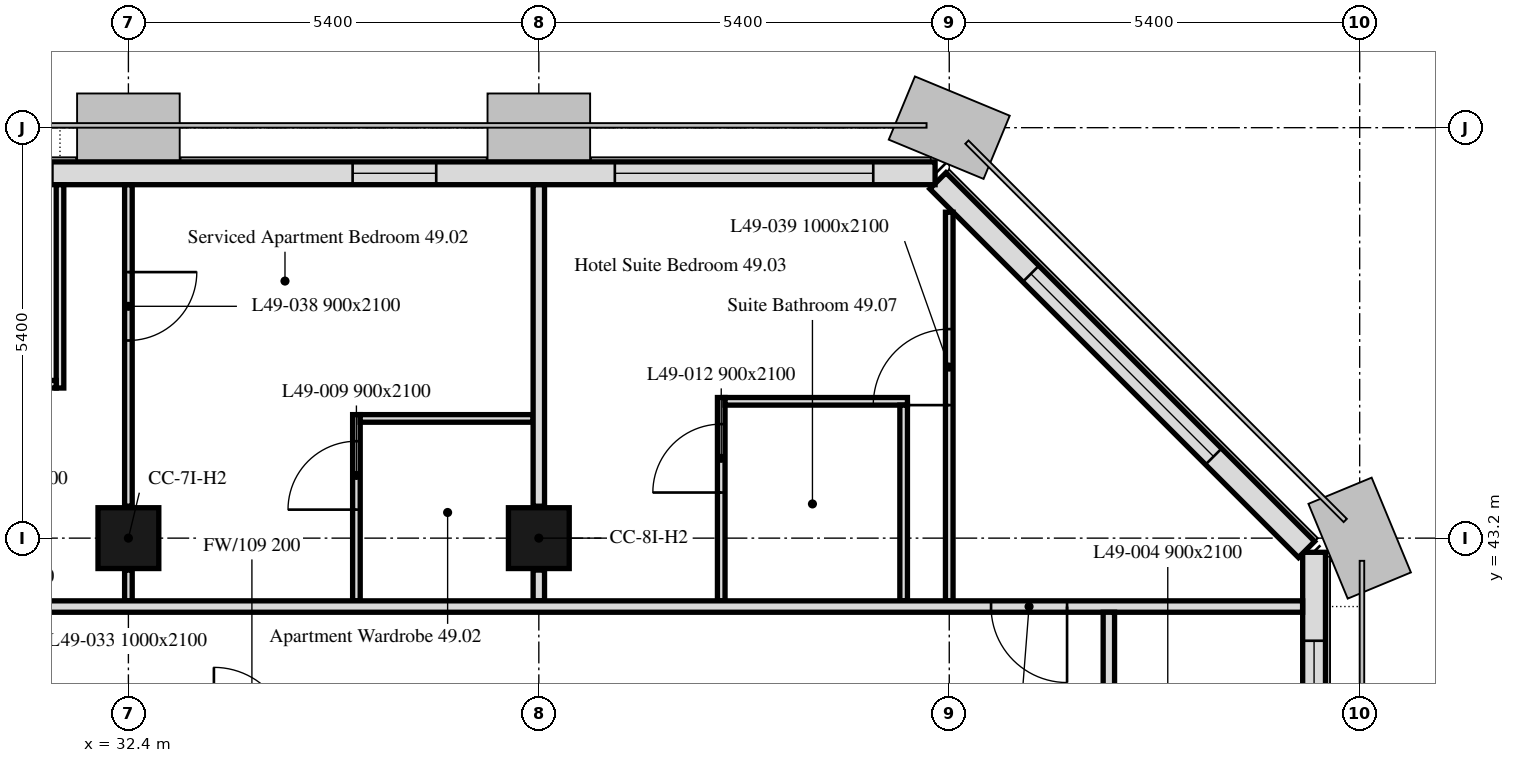
"""IFC4 building model, lengths in metres.
Left out: names, types, materials, properties, quantities, classifications, styles, units other than length and angle.
Written with IfcOpenShell. Run it as: python <this file> out.ifc"""

import sys

from ifc_helpers import new_model, si_unit, direction, frame, frame_2d, origin, origin_2d, place, context, subcontext, project, spatial, rectangle, extrude, element, fill, save


model = new_model("IFC4")
c1 = context("Model", 3, precision=1e-05, world=origin(), true_north=direction((0.0, 1.0)))
c2 = subcontext(c1, "Body", "Model", "MODEL_VIEW")
j1 = project(units=[si_unit("LENGTHUNIT", "METRE"), si_unit("PLANEANGLEUNIT", "RADIAN")], contexts=[c1])
p1 = place(None, origin())
s1 = spatial("IfcSite", under=j1, at=p1, CompositionType="ELEMENT")
p2 = place(p1, origin())
s2 = spatial("IfcBuilding", under=s1, at=p2, CompositionType="ELEMENT")
p3 = place(p2, frame((0.0, 0.0, 200.5)))
s3 = spatial("IfcBuildingStorey", under=s2, at=p3, CompositionType="ELEMENT", Elevation=200.5)
for number, where, z_axis, x_axis in (
    (1, (32.4, 43.2, 0.0), (0.0, 0.0, 1.0), (1.0, 0.0, 0.0)),
    (2, (37.8, 43.2, 0.0), (0.0, 0.0, 1.0), (1.0, 0.0, 0.0)),
):
    element("IfcColumn", number, at=place(p3, frame(where, z_axis=z_axis, x_axis=x_axis)), inside=s3, PredefinedType="COLUMN", context=c2, shape_type="SweptSolid", body=[
        extrude(rectangle(XDim=0.8, YDim=0.8, at=origin_2d()), origin(), (0.0, 0.0, 1.0), 3.0),
    ])
p4 = place(p3, frame((48.0, 10.986, 0.0), z_axis=(0.0, 0.0, 1.0), x_axis=(0.0, 1.0, 0.0)))
e3 = element("IfcWall", 3, at=p4, inside=s3, PredefinedType="SOLIDWALL", context=c2, shape_type="SweptSolid", body=[
    extrude(rectangle(XDim=32.027, YDim=0.3, at=frame_2d((16.014, 0.0))), origin(), (0.0, 0.0, 1.0), 3.0),
])
p5 = place(p4, frame((1.164, 0.0, 0.9)))
e4 = element("IfcOpeningElement", 4, at=p5, cuts=e3, PredefinedType="OPENING", context=c2, shape_type="SweptSolid", body=[
    extrude(rectangle(XDim=1.1, YDim=1.7, at=frame_2d((0.55, 0.85))), frame((0.0, 0.16, 0.0), z_axis=(0.0, -1.0, 0.0), x_axis=(1.0, 0.0, 0.0)), (0.0, 0.0, 1.0), 0.32),
])
p6 = place(p4, frame((2.764, 0.0, 0.9)))
e5 = element("IfcOpeningElement", 5, at=p6, cuts=e3, PredefinedType="OPENING", context=c2, shape_type="SweptSolid", body=[
    extrude(rectangle(XDim=1.1, YDim=1.7, at=frame_2d((0.55, 0.85))), frame((0.0, 0.16, 0.0), z_axis=(0.0, -1.0, 0.0), x_axis=(1.0, 0.0, 0.0)), (0.0, 0.0, 1.0), 0.32),
])
p7 = place(p4, frame((6.564, 0.0, 0.9)))
e6 = element("IfcOpeningElement", 6, at=p7, cuts=e3, PredefinedType="OPENING", context=c2, shape_type="SweptSolid", body=[
    extrude(rectangle(XDim=1.1, YDim=1.7, at=frame_2d((0.55, 0.85))), frame((0.0, 0.16, 0.0), z_axis=(0.0, -1.0, 0.0), x_axis=(1.0, 0.0, 0.0)), (0.0, 0.0, 1.0), 0.32),
])
p8 = place(p4, frame((8.164, 0.0, 0.9)))
e7 = element("IfcOpeningElement", 7, at=p8, cuts=e3, PredefinedType="OPENING", context=c2, shape_type="SweptSolid", body=[
    extrude(rectangle(XDim=1.1, YDim=1.7, at=frame_2d((0.55, 0.85))), frame((0.0, 0.16, 0.0), z_axis=(0.0, -1.0, 0.0), x_axis=(1.0, 0.0, 0.0)), (0.0, 0.0, 1.0), 0.32),
])
p9 = place(p4, frame((11.964, 0.0, 0.9)))
e8 = element("IfcOpeningElement", 8, at=p9, cuts=e3, PredefinedType="OPENING", context=c2, shape_type="SweptSolid", body=[
    extrude(rectangle(XDim=1.1, YDim=1.7, at=frame_2d((0.55, 0.85))), frame((0.0, 0.16, 0.0), z_axis=(0.0, -1.0, 0.0), x_axis=(1.0, 0.0, 0.0)), (0.0, 0.0, 1.0), 0.32),
])
p10 = place(p4, frame((13.564, 0.0, 0.9)))
e9 = element("IfcOpeningElement", 9, at=p10, cuts=e3, PredefinedType="OPENING", context=c2, shape_type="SweptSolid", body=[
    extrude(rectangle(XDim=1.1, YDim=1.7, at=frame_2d((0.55, 0.85))), frame((0.0, 0.16, 0.0), z_axis=(0.0, -1.0, 0.0), x_axis=(1.0, 0.0, 0.0)), (0.0, 0.0, 1.0), 0.32),
])
p11 = place(p4, frame((17.364, 0.0, 0.9)))
e10 = element("IfcOpeningElement", 10, at=p11, cuts=e3, PredefinedType="OPENING", context=c2, shape_type="SweptSolid", body=[
    extrude(rectangle(XDim=1.1, YDim=1.7, at=frame_2d((0.55, 0.85))), frame((0.0, 0.16, 0.0), z_axis=(0.0, -1.0, 0.0), x_axis=(1.0, 0.0, 0.0)), (0.0, 0.0, 1.0), 0.32),
])
p12 = place(p4, frame((18.964, 0.0, 0.9)))
e11 = element("IfcOpeningElement", 11, at=p12, cuts=e3, PredefinedType="OPENING", context=c2, shape_type="SweptSolid", body=[
    extrude(rectangle(XDim=1.1, YDim=1.7, at=frame_2d((0.55, 0.85))), frame((0.0, 0.16, 0.0), z_axis=(0.0, -1.0, 0.0), x_axis=(1.0, 0.0, 0.0)), (0.0, 0.0, 1.0), 0.32),
])
p13 = place(p4, frame((22.414, 0.0, 0.9)))
e12 = element("IfcOpeningElement", 12, at=p13, cuts=e3, PredefinedType="OPENING", context=c2, shape_type="SweptSolid", body=[
    extrude(rectangle(XDim=3.4, YDim=1.7, at=frame_2d((1.7, 0.85))), frame((0.0, 0.16, 0.0), z_axis=(0.0, -1.0, 0.0), x_axis=(1.0, 0.0, 0.0)), (0.0, 0.0, 1.0), 0.32),
])
p14 = place(p4, frame((28.789, 0.0, 0.9)))
e13 = element("IfcOpeningElement", 13, at=p14, cuts=e3, PredefinedType="OPENING", context=c2, shape_type="SweptSolid", body=[
    extrude(rectangle(XDim=0.65, YDim=1.7, at=frame_2d((0.325, 0.85))), frame((0.0, 0.16, 0.0), z_axis=(0.0, -1.0, 0.0), x_axis=(1.0, 0.0, 0.0)), (0.0, 0.0, 1.0), 0.32),
])
p15 = place(p4, frame((29.764, 0.0, 0.9)))
e14 = element("IfcOpeningElement", 14, at=p15, cuts=e3, PredefinedType="OPENING", context=c2, shape_type="SweptSolid", body=[
    extrude(rectangle(XDim=1.1, YDim=1.7, at=frame_2d((0.55, 0.85))), frame((0.0, 0.16, 0.0), z_axis=(0.0, -1.0, 0.0), x_axis=(1.0, 0.0, 0.0)), (0.0, 0.0, 1.0), 0.32),
])
p16 = place(p3, frame((47.901, 43.051, 0.0), z_axis=(0.0, 0.0, 1.0), x_axis=(-0.707106781187, 0.707106781187, 0.0)))
e15 = element("IfcWall", 15, at=p16, inside=s3, PredefinedType="SOLIDWALL", context=c2, shape_type="SweptSolid", body=[
    extrude(rectangle(XDim=6.86, YDim=0.3, at=frame_2d((3.43, 0.0))), origin(), (0.0, 0.0, 1.0), 3.0),
])
p17 = place(p16, frame((1.73, 0.0, 0.9)))
e16 = element("IfcOpeningElement", 16, at=p17, cuts=e15, PredefinedType="OPENING", context=c2, shape_type="SweptSolid", body=[
    extrude(rectangle(XDim=3.4, YDim=1.7, at=frame_2d((1.7, 0.85))), frame((0.0, 0.16, 0.0), z_axis=(0.0, -1.0, 0.0), x_axis=(1.0, 0.0, 0.0)), (0.0, 0.0, 1.0), 0.32),
])
p18 = place(p3, frame((43.014, 48.0, 0.0), z_axis=(0.0, 0.0, 1.0), x_axis=(-1.0, 0.0, 0.0)))
e17 = element("IfcWall", 17, at=p18, inside=s3, PredefinedType="SOLIDWALL", context=c2, shape_type="SweptSolid", body=[
    extrude(rectangle(XDim=32.027, YDim=0.3, at=frame_2d((16.014, 0.0))), origin(), (0.0, 0.0, 1.0), 3.0),
])
p19 = place(p18, frame((0.814, 0.0, 0.9)))
e18 = element("IfcOpeningElement", 18, at=p19, cuts=e17, PredefinedType="OPENING", context=c2, shape_type="SweptSolid", body=[
    extrude(rectangle(XDim=3.4, YDim=1.7, at=frame_2d((1.7, 0.85))), frame((0.0, 0.16, 0.0), z_axis=(0.0, -1.0, 0.0), x_axis=(1.0, 0.0, 0.0)), (0.0, 0.0, 1.0), 0.32),
])
p20 = place(p18, frame((6.564, 0.0, 0.9)))
e19 = element("IfcOpeningElement", 19, at=p20, cuts=e17, PredefinedType="OPENING", context=c2, shape_type="SweptSolid", body=[
    extrude(rectangle(XDim=1.1, YDim=1.7, at=frame_2d((0.55, 0.85))), frame((0.0, 0.16, 0.0), z_axis=(0.0, -1.0, 0.0), x_axis=(1.0, 0.0, 0.0)), (0.0, 0.0, 1.0), 0.32),
])
p21 = place(p18, frame((11.614, 0.0, 0.9)))
e20 = element("IfcOpeningElement", 20, at=p21, cuts=e17, PredefinedType="OPENING", context=c2, shape_type="SweptSolid", body=[
    extrude(rectangle(XDim=3.4, YDim=1.7, at=frame_2d((1.7, 0.85))), frame((0.0, 0.16, 0.0), z_axis=(0.0, -1.0, 0.0), x_axis=(1.0, 0.0, 0.0)), (0.0, 0.0, 1.0), 0.32),
])
p22 = place(p18, frame((17.364, 0.0, 0.9)))
e21 = element("IfcOpeningElement", 21, at=p22, cuts=e17, PredefinedType="OPENING", context=c2, shape_type="SweptSolid", body=[
    extrude(rectangle(XDim=1.1, YDim=1.7, at=frame_2d((0.55, 0.85))), frame((0.0, 0.16, 0.0), z_axis=(0.0, -1.0, 0.0), x_axis=(1.0, 0.0, 0.0)), (0.0, 0.0, 1.0), 0.32),
])
p23 = place(p18, frame((22.414, 0.0, 0.9)))
e22 = element("IfcOpeningElement", 22, at=p23, cuts=e17, PredefinedType="OPENING", context=c2, shape_type="SweptSolid", body=[
    extrude(rectangle(XDim=3.4, YDim=1.7, at=frame_2d((1.7, 0.85))), frame((0.0, 0.16, 0.0), z_axis=(0.0, -1.0, 0.0), x_axis=(1.0, 0.0, 0.0)), (0.0, 0.0, 1.0), 0.32),
])
p24 = place(p18, frame((28.164, 0.0, 0.9)))
e23 = element("IfcOpeningElement", 23, at=p24, cuts=e17, PredefinedType="OPENING", context=c2, shape_type="SweptSolid", body=[
    extrude(rectangle(XDim=1.1, YDim=1.7, at=frame_2d((0.55, 0.85))), frame((0.0, 0.16, 0.0), z_axis=(0.0, -1.0, 0.0), x_axis=(1.0, 0.0, 0.0)), (0.0, 0.0, 1.0), 0.32),
])
p25 = place(p3, frame((32.4, 47.849, 0.0), z_axis=(0.0, 0.0, 1.0), x_axis=(0.0, -1.0, 0.0)))
e24 = element("IfcWall", 24, at=p25, inside=s3, PredefinedType="PARTITIONING", context=c2, shape_type="SweptSolid", body=[
    extrude(rectangle(XDim=4.229, YDim=0.1, at=frame_2d((2.115, 0.0))), origin(), (0.0, 0.0, 1.0), 2.4),
])
p26 = place(p25, frame((1.149, 0.0, 0.0)))
e25 = element("IfcOpeningElement", 25, at=p26, cuts=e24, PredefinedType="OPENING", context=c2, shape_type="SweptSolid", body=[
    extrude(rectangle(XDim=0.9, YDim=2.1, at=frame_2d((0.45, 1.05))), frame((0.0, 0.05, 0.0), z_axis=(0.0, -1.0, 0.0), x_axis=(1.0, 0.0, 0.0)), (0.0, 0.0, 1.0), 0.1),
])
p27 = place(p3, frame((32.4, 42.78, 0.0), z_axis=(0.0, 0.0, 1.0), x_axis=(0.0, -1.0, 0.0)))
e26 = element("IfcWall", 26, at=p27, inside=s3, PredefinedType="PARTITIONING", context=c2, shape_type="SweptSolid", body=[
    extrude(rectangle(XDim=0.405, YDim=0.1, at=frame_2d((0.203, 0.0))), origin(), (0.0, 0.0, 1.0), 2.4),
])
p28 = place(p3, frame((35.4, 42.375, 0.0), z_axis=(0.0, 0.0, 1.0), x_axis=(0.0, 1.0, 0.0)))
e27 = element("IfcWall", 27, at=p28, inside=s3, PredefinedType="PARTITIONING", context=c2, shape_type="SweptSolid", body=[
    extrude(rectangle(XDim=2.45, YDim=0.1, at=frame_2d((1.225, 0.0))), origin(), (0.0, 0.0, 1.0), 3.0),
])
p29 = place(p28, frame((1.2, 0.0, 0.0)))
e28 = element("IfcOpeningElement", 28, at=p29, cuts=e27, PredefinedType="OPENING", context=c2, shape_type="SweptSolid", body=[
    extrude(rectangle(XDim=0.9, YDim=2.1, at=frame_2d((0.45, 1.05))), frame((0.0, 0.05, 0.0), z_axis=(0.0, -1.0, 0.0), x_axis=(1.0, 0.0, 0.0)), (0.0, 0.0, 1.0), 0.1),
])
p30 = place(p3, frame((35.45, 44.775, 0.0), z_axis=(0.0, 0.0, 1.0), x_axis=(1.0, 0.0, 0.0)))
e29 = element("IfcWall", 29, at=p30, inside=s3, PredefinedType="PARTITIONING", context=c2, shape_type="SweptSolid", body=[
    extrude(rectangle(XDim=2.275, YDim=0.1, at=frame_2d((1.138, 0.0))), origin(), (0.0, 0.0, 1.0), 3.0),
])
p31 = place(p3, frame((31.5, 47.849, 0.0), z_axis=(0.0, 0.0, 1.0), x_axis=(0.0, -1.0, 0.0)))
e30 = element("IfcWall", 30, at=p31, inside=s3, PredefinedType="PARTITIONING", context=c2, shape_type="SweptSolid", body=[
    extrude(rectangle(XDim=2.674, YDim=0.1, at=frame_2d((1.337, 0.0))), origin(), (0.0, 0.0, 1.0), 3.0),
])
p32 = place(p3, frame((31.45, 45.225, 0.0), z_axis=(0.0, 0.0, 1.0), x_axis=(-1.0, 0.0, 0.0)))
e31 = element("IfcWall", 31, at=p32, inside=s3, PredefinedType="PARTITIONING", context=c2, shape_type="SweptSolid", body=[
    extrude(rectangle(XDim=2.3, YDim=0.1, at=frame_2d((1.15, 0.0))), origin(), (0.0, 0.0, 1.0), 3.0),
])
p33 = place(p32, frame((1.1, 0.0, 0.0)))
e32 = element("IfcOpeningElement", 32, at=p33, cuts=e31, PredefinedType="OPENING", context=c2, shape_type="SweptSolid", body=[
    extrude(rectangle(XDim=0.9, YDim=2.1, at=frame_2d((0.45, 1.05))), frame((0.0, 0.05, 0.0), z_axis=(0.0, -1.0, 0.0), x_axis=(1.0, 0.0, 0.0)), (0.0, 0.0, 1.0), 0.1),
])
p34 = place(p3, frame((37.8, 42.375, 0.0), z_axis=(0.0, 0.0, 1.0), x_axis=(0.0, 1.0, 0.0)))
e33 = element("IfcWall", 33, at=p34, inside=s3, PredefinedType="PARTITIONING", context=c2, shape_type="SweptSolid", body=[
    extrude(rectangle(XDim=0.405, YDim=0.15, at=frame_2d((0.203, 0.0))), origin(), (0.0, 0.0, 1.0), 2.4),
])
p35 = place(p3, frame((37.8, 43.62, 0.0), z_axis=(0.0, 0.0, 1.0), x_axis=(0.0, 1.0, 0.0)))
e34 = element("IfcWall", 34, at=p35, inside=s3, PredefinedType="PARTITIONING", context=c2, shape_type="SweptSolid", body=[
    extrude(rectangle(XDim=4.229, YDim=0.15, at=frame_2d((2.115, 0.0))), origin(), (0.0, 0.0, 1.0), 2.4),
])
p36 = place(p3, frame((40.2, 42.375, 0.0), z_axis=(0.0, 0.0, 1.0), x_axis=(0.0, 1.0, 0.0)))
e35 = element("IfcWall", 35, at=p36, inside=s3, PredefinedType="PARTITIONING", context=c2, shape_type="SweptSolid", body=[
    extrude(rectangle(XDim=2.675, YDim=0.1, at=frame_2d((1.337, 0.0))), origin(), (0.0, 0.0, 1.0), 3.0),
])
p37 = place(p36, frame((1.425, 0.0, 0.0)))
e36 = element("IfcOpeningElement", 36, at=p37, cuts=e35, PredefinedType="OPENING", context=c2, shape_type="SweptSolid", body=[
    extrude(rectangle(XDim=0.9, YDim=2.1, at=frame_2d((0.45, 1.05))), frame((0.0, 0.05, 0.0), z_axis=(0.0, -1.0, 0.0), x_axis=(1.0, 0.0, 0.0)), (0.0, 0.0, 1.0), 0.1),
])
p38 = place(p3, frame((40.25, 45.0, 0.0), z_axis=(0.0, 0.0, 1.0), x_axis=(1.0, 0.0, 0.0)))
e37 = element("IfcWall", 37, at=p38, inside=s3, PredefinedType="PARTITIONING", context=c2, shape_type="SweptSolid", body=[
    extrude(rectangle(XDim=2.4, YDim=0.1, at=frame_2d((1.2, 0.0))), origin(), (0.0, 0.0, 1.0), 3.0),
])
p39 = place(p3, frame((42.6, 44.95, 0.0), z_axis=(0.0, 0.0, 1.0), x_axis=(0.0, -1.0, 0.0)))
e38 = element("IfcWall", 38, at=p39, inside=s3, PredefinedType="PARTITIONING", context=c2, shape_type="SweptSolid", body=[
    extrude(rectangle(XDim=2.575, YDim=0.1, at=frame_2d((1.288, 0.0))), origin(), (0.0, 0.0, 1.0), 3.0),
])
p40 = place(p3, frame((43.2, 42.375, 0.0), z_axis=(0.0, 0.0, 1.0), x_axis=(0.0, 1.0, 0.0)))
e39 = element("IfcWall", 39, at=p40, inside=s3, PredefinedType="PARTITIONING", context=c2, shape_type="SweptSolid", body=[
    extrude(rectangle(XDim=5.113, YDim=0.1, at=frame_2d((2.556, 0.0))), origin(), (0.0, 0.0, 1.0), 3.0),
])
p41 = place(p40, frame((2.575, 0.0, 0.0)))
e40 = element("IfcOpeningElement", 40, at=p41, cuts=e39, PredefinedType="OPENING", context=c2, shape_type="SweptSolid", body=[
    extrude(rectangle(XDim=1.0, YDim=2.1, at=frame_2d((0.5, 1.05))), frame((0.0, 0.05, 0.0), z_axis=(0.0, -1.0, 0.0), x_axis=(1.0, 0.0, 0.0)), (0.0, 0.0, 1.0), 0.1),
])
p42 = place(p3, frame((47.849, 42.3, 0.0), z_axis=(0.0, 0.0, 1.0), x_axis=(-1.0, 0.0, 0.0)))
e41 = element("IfcWall", 41, at=p42, inside=s3, PredefinedType="PARTITIONING", context=c2, shape_type="SweptSolid", body=[
    extrude(rectangle(XDim=41.698, YDim=0.15, at=frame_2d((20.849, 0.0))), origin(), (0.0, 0.0, 1.0), 2.4),
])
p43 = place(p42, frame((39.566, 0.0, 0.0)))
e42 = element("IfcOpeningElement", 42, at=p43, cuts=e41, PredefinedType="OPENING", context=c2, shape_type="SweptSolid", body=[
    extrude(rectangle(XDim=1.0, YDim=2.1, at=frame_2d((0.5, 1.05))), frame((0.0, 0.075, 0.0), z_axis=(0.0, -1.0, 0.0), x_axis=(1.0, 0.0, 0.0)), (0.0, 0.0, 1.0), 0.15),
])
p44 = place(p42, frame((3.099, 0.0, 0.0)))
e43 = element("IfcOpeningElement", 43, at=p44, cuts=e41, PredefinedType="OPENING", context=c2, shape_type="SweptSolid", body=[
    extrude(rectangle(XDim=1.0, YDim=2.1, at=frame_2d((0.5, 1.05))), frame((0.0, 0.075, 0.0), z_axis=(0.0, -1.0, 0.0), x_axis=(1.0, 0.0, 0.0)), (0.0, 0.0, 1.0), 0.15),
])
p45 = place(p42, frame((28.249, 0.0, 0.0)))
e44 = element("IfcOpeningElement", 44, at=p45, cuts=e41, PredefinedType="OPENING", context=c2, shape_type="SweptSolid", body=[
    extrude(rectangle(XDim=1.0, YDim=2.1, at=frame_2d((0.5, 1.05))), frame((0.0, 0.075, 0.0), z_axis=(0.0, -1.0, 0.0), x_axis=(1.0, 0.0, 0.0)), (0.0, 0.0, 1.0), 0.15),
])
p46 = place(p42, frame((17.449, 0.0, 0.0)))
e45 = element("IfcOpeningElement", 45, at=p46, cuts=e41, PredefinedType="OPENING", context=c2, shape_type="SweptSolid", body=[
    extrude(rectangle(XDim=1.0, YDim=2.1, at=frame_2d((0.5, 1.05))), frame((0.0, 0.075, 0.0), z_axis=(0.0, -1.0, 0.0), x_axis=(1.0, 0.0, 0.0)), (0.0, 0.0, 1.0), 0.15),
])
p47 = place(p3, frame((45.3, 42.225, 0.0), z_axis=(0.0, 0.0, 1.0), x_axis=(0.0, -1.0, 0.0)))
e46 = element("IfcWall", 46, at=p47, inside=s3, PredefinedType="PARTITIONING", context=c2, shape_type="SweptSolid", body=[
    extrude(rectangle(XDim=30.45, YDim=0.15, at=frame_2d((15.225, 0.0))), origin(), (0.0, 0.0, 1.0), 2.4),
])
p48 = place(p47, frame((12.025, 0.0, 0.0)))
e47 = element("IfcOpeningElement", 47, at=p48, cuts=e46, PredefinedType="OPENING", context=c2, shape_type="SweptSolid", body=[
    extrude(rectangle(XDim=1.0, YDim=2.1, at=frame_2d((0.5, 1.05))), frame((0.0, 0.075, 0.0), z_axis=(0.0, -1.0, 0.0), x_axis=(1.0, 0.0, 0.0)), (0.0, 0.0, 1.0), 0.15),
])
p49 = place(p47, frame((27.775, 0.0, 0.0)))
e48 = element("IfcOpeningElement", 48, at=p49, cuts=e46, PredefinedType="OPENING", context=c2, shape_type="SweptSolid", body=[
    extrude(rectangle(XDim=1.0, YDim=2.1, at=frame_2d((0.5, 1.05))), frame((0.0, 0.075, 0.0), z_axis=(0.0, -1.0, 0.0), x_axis=(1.0, 0.0, 0.0)), (0.0, 0.0, 1.0), 0.15),
])
p50 = place(p47, frame((6.192, 0.0, 0.0)))
e49 = element("IfcOpeningElement", 49, at=p50, cuts=e46, PredefinedType="OPENING", context=c2, shape_type="SweptSolid", body=[
    extrude(rectangle(XDim=1.0, YDim=2.1, at=frame_2d((0.5, 1.05))), frame((0.0, 0.075, 0.0), z_axis=(0.0, -1.0, 0.0), x_axis=(1.0, 0.0, 0.0)), (0.0, 0.0, 1.0), 0.15),
])
p51 = place(p47, frame((21.475, 0.0, 0.0)))
e50 = element("IfcOpeningElement", 50, at=p51, cuts=e46, PredefinedType="OPENING", context=c2, shape_type="SweptSolid", body=[
    extrude(rectangle(XDim=1.0, YDim=2.1, at=frame_2d((0.5, 1.05))), frame((0.0, 0.075, 0.0), z_axis=(0.0, -1.0, 0.0), x_axis=(1.0, 0.0, 0.0)), (0.0, 0.0, 1.0), 0.15),
])
p52 = place(p15, origin())
e51 = element("IfcWindow", 51, at=p52, inside=s3, PartitioningType="SINGLE_PANEL", PredefinedType="WINDOW", context=c2, shape_type="SweptSolid", body=[
    extrude(rectangle(XDim=1.1, YDim=1.7, at=frame_2d((0.55, 0.85))), frame((0.0, 0.03, 0.0), z_axis=(0.0, -1.0, 0.0), x_axis=(1.0, 0.0, 0.0)), (0.0, 0.0, 1.0), 0.06),
])
fill(e14, e51)
p53 = place(p17, origin())
e52 = element("IfcWindow", 52, at=p53, inside=s3, PartitioningType="SINGLE_PANEL", PredefinedType="WINDOW", context=c2, shape_type="SweptSolid", body=[
    extrude(rectangle(XDim=3.4, YDim=1.7, at=frame_2d((1.7, 0.85))), frame((0.0, 0.03, 0.0), z_axis=(0.0, -1.0, 0.0), x_axis=(1.0, 0.0, 0.0)), (0.0, 0.0, 1.0), 0.06),
])
fill(e16, e52)
p54 = place(p19, origin())
e53 = element("IfcWindow", 53, at=p54, inside=s3, PartitioningType="SINGLE_PANEL", PredefinedType="WINDOW", context=c2, shape_type="SweptSolid", body=[
    extrude(rectangle(XDim=3.4, YDim=1.7, at=frame_2d((1.7, 0.85))), frame((0.0, 0.03, 0.0), z_axis=(0.0, -1.0, 0.0), x_axis=(1.0, 0.0, 0.0)), (0.0, 0.0, 1.0), 0.06),
])
fill(e18, e53)
p55 = place(p20, origin())
e54 = element("IfcWindow", 54, at=p55, inside=s3, PartitioningType="SINGLE_PANEL", PredefinedType="WINDOW", context=c2, shape_type="SweptSolid", body=[
    extrude(rectangle(XDim=1.1, YDim=1.7, at=frame_2d((0.55, 0.85))), frame((0.0, 0.03, 0.0), z_axis=(0.0, -1.0, 0.0), x_axis=(1.0, 0.0, 0.0)), (0.0, 0.0, 1.0), 0.06),
])
fill(e19, e54)
p56 = place(p21, origin())
e55 = element("IfcWindow", 55, at=p56, inside=s3, PartitioningType="SINGLE_PANEL", PredefinedType="WINDOW", context=c2, shape_type="SweptSolid", body=[
    extrude(rectangle(XDim=3.4, YDim=1.7, at=frame_2d((1.7, 0.85))), frame((0.0, 0.03, 0.0), z_axis=(0.0, -1.0, 0.0), x_axis=(1.0, 0.0, 0.0)), (0.0, 0.0, 1.0), 0.06),
])
fill(e20, e55)
p57 = place(p29, origin())
e56 = element("IfcDoor", 56, at=p57, inside=s3, OperationType="SINGLE_SWING_LEFT", PredefinedType="DOOR", context=c2, shape_type="SweptSolid", body=[
    extrude(rectangle(XDim=0.9, YDim=2.1, at=frame_2d((0.45, 1.05))), frame((0.0, 0.025, 0.0), z_axis=(0.0, -1.0, 0.0), x_axis=(1.0, 0.0, 0.0)), (0.0, 0.0, 1.0), 0.05),
])
fill(e28, e56)
p58 = place(p37, origin())
e57 = element("IfcDoor", 57, at=p58, inside=s3, OperationType="SINGLE_SWING_RIGHT", PredefinedType="DOOR", context=c2, shape_type="SweptSolid", body=[
    extrude(rectangle(XDim=0.9, YDim=2.1, at=frame_2d((0.45, 1.05))), frame((0.0, 0.025, 0.0), z_axis=(0.0, -1.0, 0.0), x_axis=(1.0, 0.0, 0.0)), (0.0, 0.0, 1.0), 0.05),
])
fill(e36, e57)
p59 = place(p26, origin())
e58 = element("IfcDoor", 58, at=p59, inside=s3, OperationType="SINGLE_SWING_RIGHT", PredefinedType="DOOR", context=c2, shape_type="SweptSolid", body=[
    extrude(rectangle(XDim=0.9, YDim=2.1, at=frame_2d((0.45, 1.05))), frame((0.0, 0.025, 0.0), z_axis=(0.0, -1.0, 0.0), x_axis=(1.0, 0.0, 0.0)), (0.0, 0.0, 1.0), 0.05),
])
fill(e25, e58)
p60 = place(p41, origin())
e59 = element("IfcDoor", 59, at=p60, inside=s3, OperationType="SINGLE_SWING_RIGHT", PredefinedType="DOOR", context=c2, shape_type="SweptSolid", body=[
    extrude(rectangle(XDim=1.0, YDim=2.1, at=frame_2d((0.5, 1.05))), frame((0.0, 0.025, 0.0), z_axis=(0.0, -1.0, 0.0), x_axis=(1.0, 0.0, 0.0)), (0.0, 0.0, 1.0), 0.05),
])
fill(e40, e59)
p61 = place(p44, origin())
e60 = element("IfcDoor", 60, at=p61, inside=s3, OperationType="SINGLE_SWING_RIGHT", PredefinedType="DOOR", context=c2, shape_type="SweptSolid", body=[
    extrude(rectangle(XDim=1.0, YDim=2.1, at=frame_2d((0.5, 1.05))), frame((0.0, 0.025, 0.0), z_axis=(0.0, -1.0, 0.0), x_axis=(1.0, 0.0, 0.0)), (0.0, 0.0, 1.0), 0.05),
])
fill(e43, e60)
save(model, sys.argv[1])
